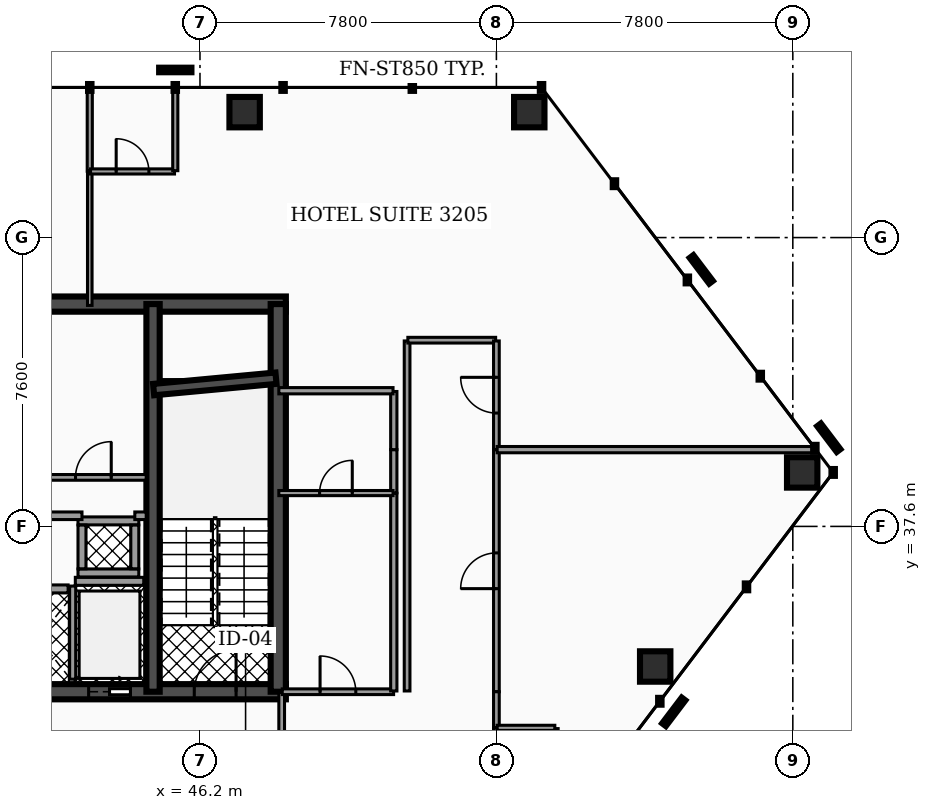
"""IFC4 building model, lengths in metres.
Left out: names, types, materials, properties, quantities, classifications, styles, units other than length and angle.
Written with IfcOpenShell. Run it as: python <this file> out.ifc"""

import sys

from ifc_helpers import new_model, si_unit, direction, frame, frame_2d, origin, origin_2d, place, context, subcontext, project, spatial, rectangle, hollow_rectangle, extrude, element, fill, save


model = new_model("IFC4")
c1 = context("Model", 3, precision=1e-05, world=origin(), true_north=direction((0.0, 1.0)))
c2 = subcontext(c1, "Body", "Model", "MODEL_VIEW")
j1 = project(units=[si_unit("LENGTHUNIT", "METRE"), si_unit("PLANEANGLEUNIT", "RADIAN")], contexts=[c1])
p1 = place(None, origin())
s1 = spatial("IfcSite", under=j1, at=p1, CompositionType="ELEMENT")
p2 = place(p1, origin())
s2 = spatial("IfcBuilding", under=s1, at=p2, CompositionType="ELEMENT")
p3 = place(p2, frame((0.0, 0.0, 134.64)))
s3 = spatial("IfcBuildingStorey", under=s2, at=p3, CompositionType="ELEMENT", Elevation=134.64)
p4 = place(p3, frame((28.4, 43.45, 0.0), z_axis=(0.0, 0.0, 1.0), x_axis=(1.0, 0.0, 0.0)))
e1 = element("IfcWall", 1, at=p4, inside=s3, PredefinedType="SHEAR", context=c2, shape_type="SweptSolid", body=[
    extrude(rectangle(XDim=20.06, YDim=0.4, at=frame_2d((10.03, 0.0))), origin(), (0.0, 0.0, 1.0), 3.5),
])
p5 = place(p3, frame((28.4, 33.25, 0.0), z_axis=(0.0, 0.0, 1.0), x_axis=(1.0, 0.0, 0.0)))
e2 = element("IfcWall", 2, at=p5, inside=s3, PredefinedType="SHEAR", context=c2, shape_type="SweptSolid", body=[
    extrude(rectangle(XDim=20.06, YDim=0.4, at=frame_2d((10.03, 0.0))), origin(), (0.0, 0.0, 1.0), 3.5),
])
p6 = place(p5, frame((4.03, 0.0, 0.0)))
e3 = element("IfcOpeningElement", 3, at=p6, cuts=e2, PredefinedType="OPENING", context=c2, shape_type="SweptSolid", body=[
    extrude(rectangle(XDim=1.1, YDim=2.15, at=frame_2d((0.55, 1.075))), frame((0.0, 0.21, 0.0), z_axis=(0.0, -1.0, 0.0), x_axis=(1.0, 0.0, 0.0)), (0.0, 0.0, 1.0), 0.42),
])
p7 = place(p5, frame((14.87, 0.0, 0.0)))
e4 = element("IfcOpeningElement", 4, at=p7, cuts=e2, PredefinedType="OPENING", context=c2, shape_type="SweptSolid", body=[
    extrude(rectangle(XDim=1.1, YDim=2.15, at=frame_2d((0.55, 1.075))), frame((0.0, 0.21, 0.0), z_axis=(0.0, -1.0, 0.0), x_axis=(1.0, 0.0, 0.0)), (0.0, 0.0, 1.0), 0.42),
])
p8 = place(p5, frame((5.95, 0.0, 0.0)))
e5 = element("IfcOpeningElement", 5, at=p8, cuts=e2, PredefinedType="OPENING", context=c2, shape_type="SweptSolid", body=[
    extrude(rectangle(XDim=1.0, YDim=2.1, at=frame_2d((0.5, 1.05))), frame((0.0, 0.21, 0.0), z_axis=(0.0, -1.0, 0.0), x_axis=(1.0, 0.0, 0.0)), (0.0, 0.0, 1.0), 0.42),
])
p9 = place(p5, frame((7.65, 0.0, 0.0)))
e6 = element("IfcOpeningElement", 6, at=p9, cuts=e2, PredefinedType="OPENING", context=c2, shape_type="SweptSolid", body=[
    extrude(rectangle(XDim=1.0, YDim=2.1, at=frame_2d((0.5, 1.05))), frame((0.0, 0.21, 0.0), z_axis=(0.0, -1.0, 0.0), x_axis=(1.0, 0.0, 0.0)), (0.0, 0.0, 1.0), 0.42),
])
p10 = place(p5, frame((1.31, 0.0, 0.0)))
e7 = element("IfcOpeningElement", 7, at=p10, cuts=e2, PredefinedType="OPENING", context=c2, shape_type="SweptSolid", body=[
    extrude(rectangle(XDim=1.1, YDim=2.2, at=frame_2d((0.55, 1.1))), frame((0.0, 0.21, 0.0), z_axis=(0.0, -1.0, 0.0), x_axis=(1.0, 0.0, 0.0)), (0.0, 0.0, 1.0), 0.42),
])
p11 = place(p5, frame((9.44, 0.0, 0.0)))
e8 = element("IfcOpeningElement", 8, at=p11, cuts=e2, PredefinedType="OPENING", context=c2, shape_type="SweptSolid", body=[
    extrude(rectangle(XDim=1.12, YDim=2.05, at=frame_2d((0.56, 1.025))), frame((0.0, 0.21, 0.0), z_axis=(0.0, -1.0, 0.0), x_axis=(1.0, 0.0, 0.0)), (0.0, 0.0, 1.0), 0.42),
])
p12 = place(p5, frame((17.65, 0.0, 0.0)))
e9 = element("IfcOpeningElement", 9, at=p12, cuts=e2, PredefinedType="OPENING", context=c2, shape_type="SweptSolid", body=[
    extrude(rectangle(XDim=1.1, YDim=2.2, at=frame_2d((0.55, 1.1))), frame((0.0, 0.21, 0.0), z_axis=(0.0, -1.0, 0.0), x_axis=(1.0, 0.0, 0.0)), (0.0, 0.0, 1.0), 0.42),
])
p13 = place(p3, frame((44.965, 33.25, 0.0), z_axis=(0.0, 0.0, 1.0), x_axis=(0.0, 1.0, 0.0)))
e10 = element("IfcWall", 10, at=p13, inside=s3, PredefinedType="SHEAR", context=c2, shape_type="SweptSolid", body=[
    extrude(rectangle(XDim=10.2, YDim=0.35, at=frame_2d((5.1, 0.0))), origin(), (0.0, 0.0, 1.0), 3.5),
])
p14 = place(p3, frame((48.26, 33.25, 0.0), z_axis=(0.0, 0.0, 1.0), x_axis=(0.0, 1.0, 0.0)))
e11 = element("IfcWall", 11, at=p14, inside=s3, PredefinedType="SHEAR", context=c2, shape_type="SweptSolid", body=[
    extrude(rectangle(XDim=10.2, YDim=0.4, at=frame_2d((5.1, 0.0))), origin(), (0.0, 0.0, 1.0), 3.5),
])
p15 = place(p3, frame((44.98, 41.2, 0.0), z_axis=(0.0, 0.0, 1.0), x_axis=(0.995686468965, 0.09278176286, 0.0)))
e12 = element("IfcWall", 12, at=p15, inside=s3, PredefinedType="SHEAR", context=c2, shape_type="SweptSolid", body=[
    extrude(rectangle(XDim=3.234, YDim=0.3, at=frame_2d((1.617, 0.0))), origin(), (0.0, 0.0, 1.0), 3.5),
])
for number, where, z_axis, x_axis in (
    (13, (54.865, 48.5, 0.0), (0.0, 0.0, 1.0), (1.0, 0.0, 0.0)),
    (14, (47.375, 48.5, 0.0), (0.0, 0.0, 1.0), (1.0, 0.0, 0.0)),
    (15, (58.178, 33.914, 0.0), (0.0, 0.0, 1.0), (1.0, 0.0, 0.0)),
    (16, (62.047, 39.02, 0.0), (0.0, 0.0, 1.0), (1.0, 0.0, 0.0)),
):
    element("IfcColumn", number, at=place(p3, frame(where, z_axis=z_axis, x_axis=x_axis)), inside=s3, PredefinedType="COLUMN", context=c2, shape_type="SweptSolid", body=[
        extrude(hollow_rectangle(XDim=0.8, YDim=0.8, WallThickness=0.04, at=origin_2d()), origin(), (0.0, 0.0, 1.0), 3.5),
    ])
p16 = place(p3, frame((42.92, 36.155, 0.0), z_axis=(0.0, 0.0, 1.0), x_axis=(1.0, 0.0, 0.0)))
e17 = element("IfcWall", 17, at=p16, inside=s3, PredefinedType="SOLIDWALL", context=c2, shape_type="SweptSolid", body=[
    extrude(rectangle(XDim=1.8, YDim=0.21, at=frame_2d((0.9, 0.0))), origin(), (0.0, 0.0, 1.0), 2.472),
])
p17 = place(p3, frame((42.85, 33.58, 0.0), z_axis=(0.0, 0.0, 1.0), x_axis=(0.0, 1.0, 0.0)))
e18 = element("IfcWall", 18, at=p17, inside=s3, PredefinedType="SOLIDWALL", context=c2, shape_type="SweptSolid", body=[
    extrude(rectangle(XDim=2.45, YDim=0.16, at=frame_2d((1.225, 0.0))), origin(), (0.0, 0.0, 1.0), 2.472),
])
p18 = place(p3, frame((41.17, 35.955, 0.0), z_axis=(0.0, 0.0, 1.0), x_axis=(1.0, 0.0, 0.0)))
e19 = element("IfcWall", 19, at=p18, inside=s3, PredefinedType="SOLIDWALL", context=c2, shape_type="SweptSolid", body=[
    extrude(rectangle(XDim=1.56, YDim=0.21, at=frame_2d((0.78, 0.0))), origin(), (0.0, 0.0, 1.0), 2.472),
])
for number, where, z_axis, x_axis in (
    (20, (42.99, 36.375, 0.0), (0.0, 0.0, 1.0), (1.0, 0.0, 0.0)),
    (21, (42.99, 37.745, 0.0), (0.0, 0.0, 1.0), (1.0, 0.0, 0.0)),
):
    element("IfcWall", number, at=place(p3, frame(where, z_axis=z_axis, x_axis=x_axis)), inside=s3, PredefinedType="SOLIDWALL", context=c2, shape_type="SweptSolid", body=[
        extrude(rectangle(XDim=1.6, YDim=0.21, at=frame_2d((0.8, 0.0))), origin(), (0.0, 0.0, 1.0), 3.5),
    ])
for number, where, z_axis, x_axis in (
    (22, (43.095, 36.485, 0.0), (0.0, 0.0, 1.0), (0.0, 1.0, 0.0)),
    (23, (44.485, 36.485, 0.0), (0.0, 0.0, 1.0), (0.0, 1.0, 0.0)),
):
    element("IfcWall", number, at=place(p3, frame(where, z_axis=z_axis, x_axis=x_axis)), inside=s3, PredefinedType="SOLIDWALL", context=c2, shape_type="SweptSolid", body=[
        extrude(rectangle(XDim=1.15, YDim=0.21, at=frame_2d((0.575, 0.0))), origin(), (0.0, 0.0, 1.0), 3.5),
    ])
p19 = place(p3, frame((42.005, 38.89, 0.0), z_axis=(0.0, 0.0, 1.0), x_axis=(1.0, 0.0, 0.0)))
e24 = element("IfcWall", 24, at=p19, inside=s3, PredefinedType="PARTITIONING", context=c2, shape_type="SweptSolid", body=[
    extrude(rectangle(XDim=2.78, YDim=0.15, at=frame_2d((1.39, 0.0))), origin(), (0.0, 0.0, 1.0), 2.457),
])
p20 = place(p19, frame((0.92, 0.0, 0.0)))
e25 = element("IfcOpeningElement", 25, at=p20, cuts=e24, PredefinedType="OPENING", context=c2, shape_type="SweptSolid", body=[
    extrude(rectangle(XDim=0.94, YDim=2.05, at=frame_2d((0.47, 1.025))), frame((0.0, 0.085, 0.0), z_axis=(0.0, -1.0, 0.0), x_axis=(1.0, 0.0, 0.0)), (0.0, 0.0, 1.0), 0.17),
])
p21 = place(p3, frame((39.27, 37.88, 0.0), z_axis=(0.0, 0.0, 1.0), x_axis=(1.0, 0.0, 0.0)))
e26 = element("IfcWall", 26, at=p21, inside=s3, PredefinedType="PARTITIONING", context=c2, shape_type="SweptSolid", body=[
    extrude(rectangle(XDim=3.825, YDim=0.2, at=frame_2d((1.913, 0.0))), origin(), (0.0, 0.0, 1.0), 2.457),
])
p22 = place(p3, frame((44.485, 37.88, 0.0), z_axis=(0.0, 0.0, 1.0), x_axis=(1.0, 0.0, 0.0)))
e27 = element("IfcWall", 27, at=p22, inside=s3, PredefinedType="PARTITIONING", context=c2, shape_type="SweptSolid", body=[
    extrude(rectangle(XDim=0.3, YDim=0.2, at=frame_2d((0.15, 0.0))), origin(), (0.0, 0.0, 1.0), 2.457),
])
p23 = place(p3, frame((48.35, 30.17, 0.0), z_axis=(0.0, 0.0, 1.0), x_axis=(0.0, 1.0, 0.0)))
e28 = element("IfcWall", 28, at=p23, inside=s3, PredefinedType="PARTITIONING", context=c2, shape_type="SweptSolid", body=[
    extrude(rectangle(XDim=3.06, YDim=0.15, at=frame_2d((1.53, 0.0))), origin(), (0.0, 0.0, 1.0), 2.457),
])
p24 = place(p23, frame((1.06, 0.0, 0.0)))
e29 = element("IfcOpeningElement", 29, at=p24, cuts=e28, PredefinedType="OPENING", context=c2, shape_type="SweptSolid", body=[
    extrude(rectangle(XDim=0.94, YDim=2.05, at=frame_2d((0.47, 1.025))), frame((0.0, 0.085, 0.0), z_axis=(0.0, -1.0, 0.0), x_axis=(1.0, 0.0, 0.0)), (0.0, 0.0, 1.0), 0.17),
])
p25 = place(p3, frame((54.0, 33.25, 0.0), z_axis=(0.0, 0.0, 1.0), x_axis=(0.0, 1.0, 0.0)))
e30 = element("IfcWall", 30, at=p25, inside=s3, PredefinedType="PARTITIONING", context=c2, shape_type="SweptSolid", body=[
    extrude(rectangle(XDim=6.365, YDim=0.15, at=frame_2d((3.183, 0.0))), origin(), (0.0, 0.0, 1.0), 2.457),
])
p26 = place(p25, frame((2.712, 0.0, 0.0)))
e31 = element("IfcOpeningElement", 31, at=p26, cuts=e30, PredefinedType="OPENING", context=c2, shape_type="SweptSolid", body=[
    extrude(rectangle(XDim=0.94, YDim=2.05, at=frame_2d((0.47, 1.025))), frame((0.0, 0.085, 0.0), z_axis=(0.0, -1.0, 0.0), x_axis=(1.0, 0.0, 0.0)), (0.0, 0.0, 1.0), 0.17),
])
p27 = place(p3, frame((54.0, 32.305, 0.0), z_axis=(0.0, 0.0, 1.0), x_axis=(0.0, 1.0, 0.0)))
e32 = element("IfcWall", 32, at=p27, inside=s3, PredefinedType="PARTITIONING", context=c2, shape_type="SweptSolid", body=[
    extrude(rectangle(XDim=0.945, YDim=0.15, at=frame_2d((0.473, 0.0))), origin(), (0.0, 0.0, 1.0), 2.457),
])
p28 = place(p3, frame((54.0, 31.085, 0.0), z_axis=(0.0, 0.0, 1.0), x_axis=(0.0, 1.0, 0.0)))
e33 = element("IfcWall", 33, at=p28, inside=s3, PredefinedType="PARTITIONING", context=c2, shape_type="SweptSolid", body=[
    extrude(rectangle(XDim=1.21, YDim=0.15, at=frame_2d((0.605, 0.0))), origin(), (0.0, 0.0, 1.0), 2.457),
])
p29 = place(p3, frame((51.65, 33.27, 0.0), z_axis=(0.0, 0.0, 1.0), x_axis=(0.0, 1.0, 0.0)))
e34 = element("IfcWall", 34, at=p29, inside=s3, PredefinedType="PARTITIONING", context=c2, shape_type="SweptSolid", body=[
    extrude(rectangle(XDim=9.21, YDim=0.15, at=frame_2d((4.605, 0.0))), origin(), (0.0, 0.0, 1.0), 2.457),
])
p30 = place(p3, frame((51.67, 42.5, 0.0), z_axis=(0.0, 0.0, 1.0), x_axis=(1.0, 0.0, 0.0)))
e35 = element("IfcWall", 35, at=p30, inside=s3, PredefinedType="PARTITIONING", context=c2, shape_type="SweptSolid", body=[
    extrude(rectangle(XDim=2.31, YDim=0.15, at=frame_2d((1.155, 0.0))), origin(), (0.0, 0.0, 1.0), 2.457),
])
p31 = place(p3, frame((54.0, 39.625, 0.0), z_axis=(0.0, 0.0, 1.0), x_axis=(0.0, 1.0, 0.0)))
e36 = element("IfcWall", 36, at=p31, inside=s3, PredefinedType="PARTITIONING", context=c2, shape_type="SweptSolid", body=[
    extrude(rectangle(XDim=2.855, YDim=0.15, at=frame_2d((1.427, 0.0))), origin(), (0.0, 0.0, 1.0), 2.457),
])
p32 = place(p31, frame((0.958, 0.0, 0.0)))
e37 = element("IfcOpeningElement", 37, at=p32, cuts=e36, PredefinedType="OPENING", context=c2, shape_type="SweptSolid", body=[
    extrude(rectangle(XDim=0.94, YDim=2.05, at=frame_2d((0.47, 1.025))), frame((0.0, 0.085, 0.0), z_axis=(0.0, -1.0, 0.0), x_axis=(1.0, 0.0, 0.0)), (0.0, 0.0, 1.0), 0.17),
])
p33 = place(p3, frame((48.365, 33.25, 0.0), z_axis=(0.0, 0.0, 1.0), x_axis=(1.0, 0.0, 0.0)))
e38 = element("IfcWall", 38, at=p33, inside=s3, PredefinedType="PARTITIONING", context=c2, shape_type="SweptSolid", body=[
    extrude(rectangle(XDim=2.93, YDim=0.15, at=frame_2d((1.465, 0.0))), origin(), (0.0, 0.0, 1.0), 2.457),
])
p34 = place(p33, frame((0.995, 0.0, 0.0)))
e39 = element("IfcOpeningElement", 39, at=p34, cuts=e38, PredefinedType="OPENING", context=c2, shape_type="SweptSolid", body=[
    extrude(rectangle(XDim=0.94, YDim=2.05, at=frame_2d((0.47, 1.025))), frame((0.0, 0.085, 0.0), z_axis=(0.0, -1.0, 0.0), x_axis=(1.0, 0.0, 0.0)), (0.0, 0.0, 1.0), 0.17),
])
p35 = place(p3, frame((43.3, 43.415, 0.0), z_axis=(0.0, 0.0, 1.0), x_axis=(0.0, 1.0, 0.0)))
e40 = element("IfcWall", 40, at=p35, inside=s3, PredefinedType="PARTITIONING", context=c2, shape_type="SweptSolid", body=[
    extrude(rectangle(XDim=3.52, YDim=0.12, at=frame_2d((1.76, 0.0))), origin(), (0.0, 0.0, 1.0), 2.457),
])
p36 = place(p3, frame((43.3, 46.945, 0.0), z_axis=(0.0, 0.0, 1.0), x_axis=(0.0, 1.0, 0.0)))
e41 = element("IfcWall", 41, at=p36, inside=s3, PredefinedType="PARTITIONING", context=c2, shape_type="SweptSolid", body=[
    extrude(rectangle(XDim=2.19, YDim=0.135, at=frame_2d((1.095, 0.0))), origin(), (0.0, 0.0, 1.0), 2.457),
])
p37 = place(p3, frame((55.557, 30.17, 0.0), z_axis=(0.0, 0.0, 1.0), x_axis=(0.0, 1.0, 0.0)))
e42 = element("IfcWall", 42, at=p37, inside=s3, PredefinedType="PARTITIONING", context=c2, shape_type="SweptSolid", body=[
    extrude(rectangle(XDim=2.11, YDim=0.135, at=frame_2d((1.055, 0.0))), origin(), (0.0, 0.0, 1.0), 2.457),
])
p38 = place(p37, frame((0.625, 0.0, 0.0)))
e43 = element("IfcOpeningElement", 43, at=p38, cuts=e42, PredefinedType="OPENING", context=c2, shape_type="SweptSolid", body=[
    extrude(rectangle(XDim=0.86, YDim=2.05, at=frame_2d((0.43, 1.025))), frame((0.0, 0.077, 0.0), z_axis=(0.0, -1.0, 0.0), x_axis=(1.0, 0.0, 0.0)), (0.0, 0.0, 1.0), 0.155),
])
p39 = place(p3, frame((54.02, 32.3, 0.0), z_axis=(0.0, 0.0, 1.0), x_axis=(1.0, 0.0, 0.0)))
e44 = element("IfcWall", 44, at=p39, inside=s3, PredefinedType="PARTITIONING", context=c2, shape_type="SweptSolid", body=[
    extrude(rectangle(XDim=1.517, YDim=0.135, at=frame_2d((0.759, 0.0))), origin(), (0.0, 0.0, 1.0), 2.457),
])
p40 = place(p3, frame((54.02, 39.62, 0.0), z_axis=(0.0, 0.0, 1.0), x_axis=(1.0, 0.0, 0.0)))
e45 = element("IfcWall", 45, at=p40, inside=s3, PredefinedType="PARTITIONING", context=c2, shape_type="SweptSolid", body=[
    extrude(rectangle(XDim=8.373, YDim=0.165, at=frame_2d((4.186, 0.0))), origin(), (0.0, 0.0, 1.0), 2.457),
])
p41 = place(p3, frame((43.32, 46.94, 0.0), z_axis=(0.0, 0.0, 1.0), x_axis=(1.0, 0.0, 0.0)))
e46 = element("IfcWall", 46, at=p41, inside=s3, PredefinedType="PARTITIONING", context=c2, shape_type="SweptSolid", body=[
    extrude(rectangle(XDim=2.21, YDim=0.135, at=frame_2d((1.105, 0.0))), origin(), (0.0, 0.0, 1.0), 2.457),
])
p42 = place(p41, frame((0.675, 0.0, 0.0)))
e47 = element("IfcOpeningElement", 47, at=p42, cuts=e46, PredefinedType="OPENING", context=c2, shape_type="SweptSolid", body=[
    extrude(rectangle(XDim=0.86, YDim=2.05, at=frame_2d((0.43, 1.025))), frame((0.0, 0.077, 0.0), z_axis=(0.0, -1.0, 0.0), x_axis=(1.0, 0.0, 0.0)), (0.0, 0.0, 1.0), 0.155),
])
p43 = place(p3, frame((45.55, 46.96, 0.0), z_axis=(0.0, 0.0, 1.0), x_axis=(0.0, 1.0, 0.0)))
e48 = element("IfcWall", 48, at=p43, inside=s3, PredefinedType="PARTITIONING", context=c2, shape_type="SweptSolid", body=[
    extrude(rectangle(XDim=2.175, YDim=0.135, at=frame_2d((1.087, 0.0))), origin(), (0.0, 0.0, 1.0), 2.457),
])
p44 = place(p3, frame((51.3, 33.27, 0.0), z_axis=(0.0, 0.0, 1.0), x_axis=(0.0, 1.0, 0.0)))
e49 = element("IfcWall", 49, at=p44, inside=s3, PredefinedType="PARTITIONING", context=c2, shape_type="SweptSolid", body=[
    extrude(rectangle(XDim=5.202, YDim=0.165, at=frame_2d((2.601, 0.0))), origin(), (0.0, 0.0, 1.0), 2.457),
])
p45 = place(p3, frame((51.3, 38.482, 0.0), z_axis=(0.0, 0.0, 1.0), x_axis=(0.0, 1.0, 0.0)))
e50 = element("IfcWall", 50, at=p45, inside=s3, PredefinedType="PARTITIONING", context=c2, shape_type="SweptSolid", body=[
    extrude(rectangle(XDim=1.138, YDim=0.165, at=frame_2d((0.569, 0.0))), origin(), (0.0, 0.0, 1.0), 2.457),
])
p46 = place(p3, frame((51.3, 39.62, 0.0), z_axis=(0.0, 0.0, 1.0), x_axis=(0.0, 1.0, 0.0)))
e51 = element("IfcWall", 51, at=p46, inside=s3, PredefinedType="PARTITIONING", context=c2, shape_type="SweptSolid", body=[
    extrude(rectangle(XDim=1.53, YDim=0.165, at=frame_2d((0.765, 0.0))), origin(), (0.0, 0.0, 1.0), 2.457),
])
p47 = place(p3, frame((48.275, 41.17, 0.0), z_axis=(0.0, 0.0, 1.0), x_axis=(1.0, 0.0, 0.0)))
e52 = element("IfcWall", 52, at=p47, inside=s3, PredefinedType="PARTITIONING", context=c2, shape_type="SweptSolid", body=[
    extrude(rectangle(XDim=3.005, YDim=0.165, at=frame_2d((1.502, 0.0))), origin(), (0.0, 0.0, 1.0), 2.457),
])
p48 = place(p3, frame((48.275, 38.477, 0.0), z_axis=(0.0, 0.0, 1.0), x_axis=(1.0, 0.0, 0.0)))
e53 = element("IfcWall", 53, at=p48, inside=s3, PredefinedType="PARTITIONING", context=c2, shape_type="SweptSolid", body=[
    extrude(rectangle(XDim=3.005, YDim=0.135, at=frame_2d((1.502, 0.0))), origin(), (0.0, 0.0, 1.0), 2.457),
])
p49 = place(p48, frame((1.073, 0.0, 0.0)))
e54 = element("IfcOpeningElement", 54, at=p49, cuts=e53, PredefinedType="OPENING", context=c2, shape_type="SweptSolid", body=[
    extrude(rectangle(XDim=0.86, YDim=2.05, at=frame_2d((0.43, 1.025))), frame((0.0, 0.077, 0.0), z_axis=(0.0, -1.0, 0.0), x_axis=(1.0, 0.0, 0.0)), (0.0, 0.0, 1.0), 0.155),
])
p50 = place(p7, origin())
e55 = element("IfcDoor", 55, at=p50, inside=s3, OperationType="SLIDING_TO_RIGHT", PredefinedType="DOOR", context=c2, shape_type="SweptSolid", body=[
    extrude(rectangle(XDim=1.1, YDim=2.15, at=frame_2d((0.55, 1.075))), frame((0.0, 0.025, 0.0), z_axis=(0.0, -1.0, 0.0), x_axis=(1.0, 0.0, 0.0)), (0.0, 0.0, 1.0), 0.05),
])
fill(e4, e55)
p51 = place(p12, origin())
e56 = element("IfcDoor", 56, at=p51, inside=s3, OperationType="SINGLE_SWING_RIGHT", PredefinedType="DOOR", context=c2, shape_type="SweptSolid", body=[
    extrude(rectangle(XDim=1.1, YDim=2.2, at=frame_2d((0.55, 1.1))), frame((0.0, 0.025, 0.0), z_axis=(0.0, -1.0, 0.0), x_axis=(1.0, 0.0, 0.0)), (0.0, 0.0, 1.0), 0.05),
])
fill(e9, e56)
p52 = place(p20, origin())
e57 = element("IfcDoor", 57, at=p52, inside=s3, OperationType="SINGLE_SWING_RIGHT", PredefinedType="DOOR", context=c2, shape_type="SweptSolid", body=[
    extrude(rectangle(XDim=0.94, YDim=2.05, at=frame_2d((0.47, 1.025))), frame((0.0, 0.025, 0.0), z_axis=(0.0, -1.0, 0.0), x_axis=(1.0, 0.0, 0.0)), (0.0, 0.0, 1.0), 0.05),
])
fill(e25, e57)
p53 = place(p26, origin())
e58 = element("IfcDoor", 58, at=p53, inside=s3, OperationType="SINGLE_SWING_LEFT", PredefinedType="DOOR", context=c2, shape_type="SweptSolid", body=[
    extrude(rectangle(XDim=0.94, YDim=2.05, at=frame_2d((0.47, 1.025))), frame((0.0, 0.025, 0.0), z_axis=(0.0, -1.0, 0.0), x_axis=(1.0, 0.0, 0.0)), (0.0, 0.0, 1.0), 0.05),
])
fill(e31, e58)
p54 = place(p32, origin())
e59 = element("IfcDoor", 59, at=p54, inside=s3, OperationType="SINGLE_SWING_RIGHT", PredefinedType="DOOR", context=c2, shape_type="SweptSolid", body=[
    extrude(rectangle(XDim=0.94, YDim=2.05, at=frame_2d((0.47, 1.025))), frame((0.0, 0.025, 0.0), z_axis=(0.0, -1.0, 0.0), x_axis=(1.0, 0.0, 0.0)), (0.0, 0.0, 1.0), 0.05),
])
fill(e37, e59)
p55 = place(p34, origin())
e60 = element("IfcDoor", 60, at=p55, inside=s3, OperationType="SINGLE_SWING_LEFT", PredefinedType="DOOR", context=c2, shape_type="SweptSolid", body=[
    extrude(rectangle(XDim=0.94, YDim=2.05, at=frame_2d((0.47, 1.025))), frame((0.0, 0.025, 0.0), z_axis=(0.0, -1.0, 0.0), x_axis=(1.0, 0.0, 0.0)), (0.0, 0.0, 1.0), 0.05),
])
fill(e39, e60)
p56 = place(p42, origin())
e61 = element("IfcDoor", 61, at=p56, inside=s3, OperationType="SINGLE_SWING_LEFT", PredefinedType="DOOR", context=c2, shape_type="SweptSolid", body=[
    extrude(rectangle(XDim=0.86, YDim=2.05, at=frame_2d((0.43, 1.025))), frame((0.0, 0.025, 0.0), z_axis=(0.0, -1.0, 0.0), x_axis=(1.0, 0.0, 0.0)), (0.0, 0.0, 1.0), 0.05),
])
fill(e47, e61)
p57 = place(p49, origin())
e62 = element("IfcDoor", 62, at=p57, inside=s3, OperationType="SINGLE_SWING_RIGHT", PredefinedType="DOOR", context=c2, shape_type="SweptSolid", body=[
    extrude(rectangle(XDim=0.86, YDim=2.05, at=frame_2d((0.43, 1.025))), frame((0.0, 0.025, 0.0), z_axis=(0.0, -1.0, 0.0), x_axis=(1.0, 0.0, 0.0)), (0.0, 0.0, 1.0), 0.05),
])
fill(e54, e62)
save(model, sys.argv[1])
